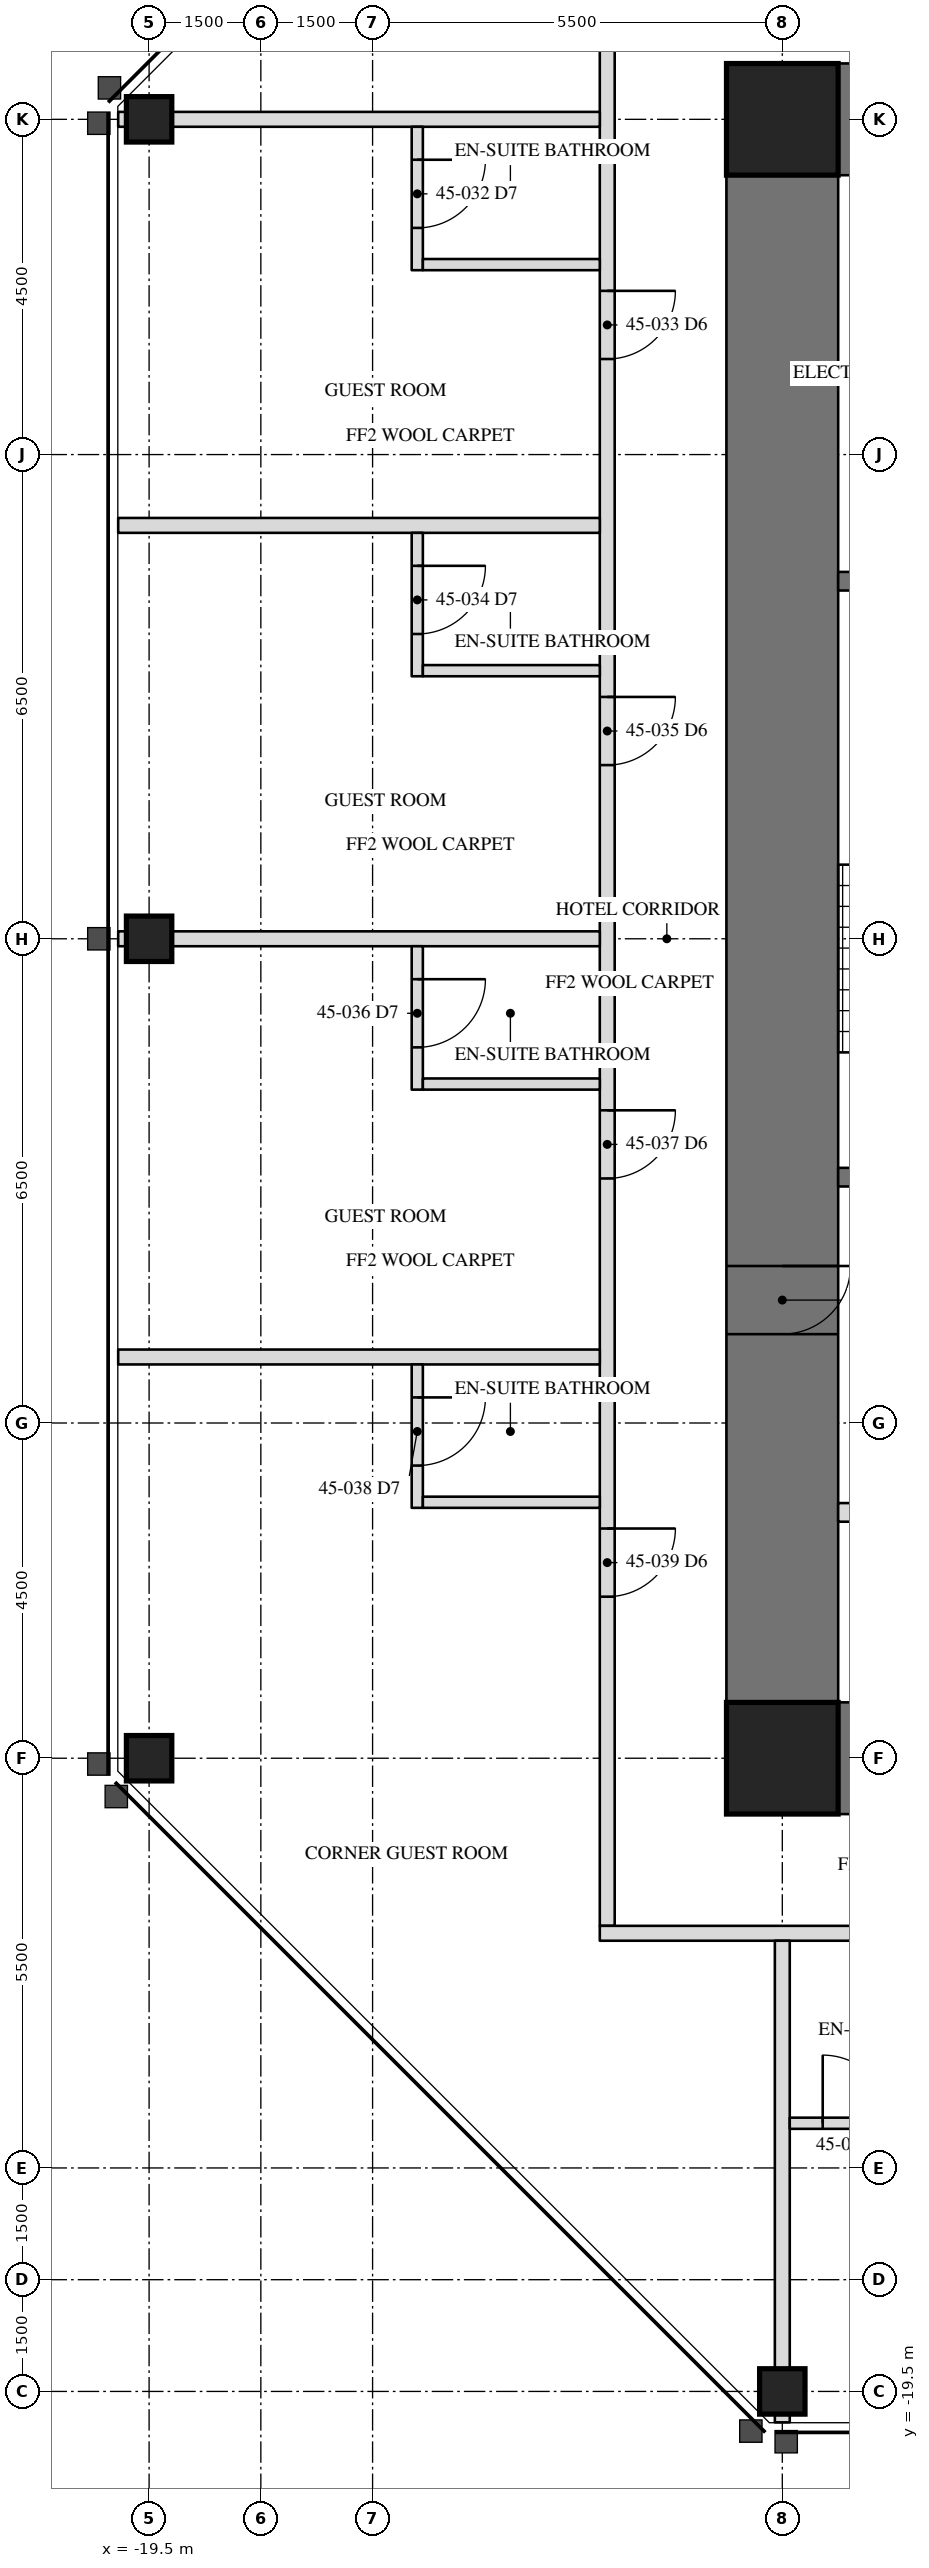
"""IFC4 building model, lengths in metres.
Left out: names, types, materials, properties, quantities, classifications, styles, units other than length and angle.
Written with IfcOpenShell. Run it as: python <this file> out.ifc"""

import sys

from ifc_helpers import new_model, si_unit, direction, frame, frame_2d, origin, origin_2d, place, context, subcontext, project, spatial, rectangle, hollow_rectangle, extrude, element, fill, save


model = new_model("IFC4")
c1 = context("Model", 3, precision=1e-05, world=origin(), true_north=direction((0.0, 1.0)))
c2 = subcontext(c1, "Body", "Model", "MODEL_VIEW")
j1 = project(units=[si_unit("LENGTHUNIT", "METRE"), si_unit("PLANEANGLEUNIT", "RADIAN")], contexts=[c1])
p1 = place(None, origin())
s1 = spatial("IfcSite", under=j1, at=p1, CompositionType="ELEMENT")
p2 = place(p1, origin())
s2 = spatial("IfcBuilding", under=s1, at=p2, CompositionType="ELEMENT")
p3 = place(p2, frame((0.0, 0.0, 194.2)))
s3 = spatial("IfcBuildingStorey", under=s2, at=p3, CompositionType="ELEMENT", Elevation=194.2)
for number, where, z_axis, x_axis in (
    (1, (-19.5, 0.0, 0.0), (0.0, 0.0, 1.0), (0.0, 1.0, 0.0)),
    (2, (-19.5, -11.0, 0.0), (0.0, 0.0, 1.0), (0.0, 1.0, 0.0)),
    (3, (-11.0, -19.5, 0.0), (0.0, 0.0, 1.0), (1.0, 0.0, 0.0)),
    (4, (-19.5, 11.0, 0.0), (0.0, 0.0, 1.0), (0.0, 1.0, 0.0)),
):
    element("IfcColumn", number, at=place(p3, frame(where, z_axis=z_axis, x_axis=x_axis)), inside=s3, PredefinedType="COLUMN", context=c2, shape_type="SweptSolid", body=[
        extrude(hollow_rectangle(XDim=0.61, YDim=0.61, WallThickness=0.076, at=origin_2d()), origin(), (0.0, 0.0, 1.0), 3.5),
    ])
p4 = place(p3, frame((-11.0, 11.0, 0.0), z_axis=(0.0, 0.0, 1.0), x_axis=(0.0, -1.0, 0.0)))
e5 = element("IfcWall", 5, at=p4, inside=s3, PredefinedType="SHEAR", context=c2, shape_type="SweptSolid", body=[
    extrude(rectangle(XDim=22.0, YDim=1.5, at=frame_2d((11.0, 0.0))), origin(), (0.0, 0.0, 1.0), 3.5),
])
p5 = place(p4, frame((15.393, 0.0, 0.0)))
e6 = element("IfcOpeningElement", 6, at=p5, cuts=e5, PredefinedType="OPENING", context=c2, shape_type="SweptSolid", body=[
    extrude(rectangle(XDim=0.915, YDim=2.134, at=frame_2d((0.458, 1.067))), frame((0.0, 0.76, 0.0), z_axis=(0.0, -1.0, 0.0), x_axis=(1.0, 0.0, 0.0)), (0.0, 0.0, 1.0), 1.52),
])
for number, where, z_axis, x_axis in (
    (7, (-6.5, 11.0, 0.0), (0.0, 0.0, 1.0), (-1.0, 0.0, 0.0)),
    (8, (-11.0, -11.0, 0.0), (0.0, 0.0, 1.0), (1.0, 0.0, 0.0)),
):
    element("IfcWall", number, at=place(p3, frame(where, z_axis=z_axis, x_axis=x_axis)), inside=s3, PredefinedType="SHEAR", context=c2, shape_type="SweptSolid", body=[
        extrude(rectangle(XDim=4.5, YDim=1.5, at=frame_2d((2.25, 0.0))), origin(), (0.0, 0.0, 1.0), 3.5),
    ])
for number, where, z_axis, x_axis in (
    (9, (-11.0, 11.0, 0.0), (0.0, 0.0, 1.0), (1.0, 0.0, 0.0)),
    (10, (-11.0, -11.0, 0.0), (0.0, 0.0, 1.0), (1.0, 0.0, 0.0)),
):
    element("IfcColumn", number, at=place(p3, frame(where, z_axis=z_axis, x_axis=x_axis)), inside=s3, PredefinedType="COLUMN", context=c2, shape_type="SweptSolid", body=[
        extrude(hollow_rectangle(XDim=1.499, YDim=1.499, WallThickness=0.102, at=origin_2d()), origin(), (0.0, 0.0, 1.0), 3.5),
    ])
p6 = place(p3, frame((-6.95, 4.8, 0.0), z_axis=(0.0, 0.0, 1.0), x_axis=(-1.0, 0.0, 0.0)))
e11 = element("IfcWall", 11, at=p6, inside=s3, PredefinedType="SOLIDWALL", context=c2, shape_type="SweptSolid", body=[
    extrude(rectangle(XDim=3.3, YDim=0.25, at=frame_2d((1.65, 0.0))), origin(), (0.0, 0.0, 1.0), 3.31),
])
p7 = place(p3, frame((-6.95, -3.2, 0.0), z_axis=(0.0, 0.0, 1.0), x_axis=(-1.0, 0.0, 0.0)))
e12 = element("IfcWall", 12, at=p7, inside=s3, PredefinedType="SOLIDWALL", context=c2, shape_type="SweptSolid", body=[
    extrude(rectangle(XDim=3.3, YDim=0.25, at=frame_2d((1.65, 0.0))), origin(), (0.0, 0.0, 1.0), 3.31),
])
p8 = place(p7, frame((1.116, 0.0, 0.0)))
e13 = element("IfcOpeningElement", 13, at=p8, cuts=e12, PredefinedType="OPENING", context=c2, shape_type="SweptSolid", body=[
    extrude(rectangle(XDim=1.067, YDim=2.134, at=frame_2d((0.533, 1.067))), frame((0.0, 0.135, 0.0), z_axis=(0.0, -1.0, 0.0), x_axis=(1.0, 0.0, 0.0)), (0.0, 0.0, 1.0), 0.27),
])
p9 = place(p3, frame((-6.95, -7.7, 0.0), z_axis=(0.0, 0.0, 1.0), x_axis=(-1.0, 0.0, 0.0)))
e14 = element("IfcWall", 14, at=p9, inside=s3, PredefinedType="PARTITIONING", context=c2, shape_type="SweptSolid", body=[
    extrude(rectangle(XDim=3.3, YDim=0.25, at=frame_2d((1.65, 0.0))), origin(), (0.0, 0.0, 1.0), 3.31),
])
p10 = place(p9, frame((0.45, 0.0, 0.0)))
e15 = element("IfcOpeningElement", 15, at=p10, cuts=e14, PredefinedType="OPENING", context=c2, shape_type="SweptSolid", body=[
    extrude(rectangle(XDim=1.219, YDim=2.134, at=frame_2d((0.609, 1.067))), frame((0.0, 0.135, 0.0), z_axis=(0.0, -1.0, 0.0), x_axis=(1.0, 0.0, 0.0)), (0.0, 0.0, 1.0), 0.27),
])
p11 = place(p3, frame((-13.35, 13.45, 0.0), z_axis=(0.0, 0.0, 1.0), x_axis=(0.0, -1.0, 0.0)))
e16 = element("IfcWall", 16, at=p11, inside=s3, PredefinedType="PARTITIONING", context=c2, shape_type="SweptSolid", body=[
    extrude(rectangle(XDim=26.7, YDim=0.2, at=frame_2d((13.35, 0.0))), origin(), (0.0, 0.0, 1.0), 3.31),
])
p12 = place(p11, frame((4.752, 0.0, 0.0)))
e17 = element("IfcOpeningElement", 17, at=p12, cuts=e16, PredefinedType="OPENING", context=c2, shape_type="SweptSolid", body=[
    extrude(rectangle(XDim=0.915, YDim=2.134, at=frame_2d((0.458, 1.067))), frame((0.0, 0.11, 0.0), z_axis=(0.0, -1.0, 0.0), x_axis=(1.0, 0.0, 0.0)), (0.0, 0.0, 1.0), 0.22),
])
p13 = place(p11, frame((10.204, 0.0, 0.0)))
e18 = element("IfcOpeningElement", 18, at=p13, cuts=e16, PredefinedType="OPENING", context=c2, shape_type="SweptSolid", body=[
    extrude(rectangle(XDim=0.915, YDim=2.134, at=frame_2d((0.458, 1.067))), frame((0.0, 0.11, 0.0), z_axis=(0.0, -1.0, 0.0), x_axis=(1.0, 0.0, 0.0)), (0.0, 0.0, 1.0), 0.22),
])
p14 = place(p11, frame((15.752, 0.0, 0.0)))
e19 = element("IfcOpeningElement", 19, at=p14, cuts=e16, PredefinedType="OPENING", context=c2, shape_type="SweptSolid", body=[
    extrude(rectangle(XDim=0.915, YDim=2.134, at=frame_2d((0.458, 1.067))), frame((0.0, 0.11, 0.0), z_axis=(0.0, -1.0, 0.0), x_axis=(1.0, 0.0, 0.0)), (0.0, 0.0, 1.0), 0.22),
])
p15 = place(p11, frame((21.366, 0.0, 0.0)))
e20 = element("IfcOpeningElement", 20, at=p15, cuts=e16, PredefinedType="OPENING", context=c2, shape_type="SweptSolid", body=[
    extrude(rectangle(XDim=0.915, YDim=2.134, at=frame_2d((0.458, 1.067))), frame((0.0, 0.11, 0.0), z_axis=(0.0, -1.0, 0.0), x_axis=(1.0, 0.0, 0.0)), (0.0, 0.0, 1.0), 0.22),
])
p16 = place(p3, frame((-13.45, -13.35, 0.0), z_axis=(0.0, 0.0, 1.0), x_axis=(1.0, 0.0, 0.0)))
e21 = element("IfcWall", 21, at=p16, inside=s3, PredefinedType="PARTITIONING", context=c2, shape_type="SweptSolid", body=[
    extrude(rectangle(XDim=26.7, YDim=0.2, at=frame_2d((13.35, 0.0))), origin(), (0.0, 0.0, 1.0), 3.31),
])
p17 = place(p16, frame((4.752, 0.0, 0.0)))
e22 = element("IfcOpeningElement", 22, at=p17, cuts=e21, PredefinedType="OPENING", context=c2, shape_type="SweptSolid", body=[
    extrude(rectangle(XDim=0.915, YDim=2.134, at=frame_2d((0.458, 1.067))), frame((0.0, 0.11, 0.0), z_axis=(0.0, -1.0, 0.0), x_axis=(1.0, 0.0, 0.0)), (0.0, 0.0, 1.0), 0.22),
])
p18 = place(p16, frame((10.204, 0.0, 0.0)))
e23 = element("IfcOpeningElement", 23, at=p18, cuts=e21, PredefinedType="OPENING", context=c2, shape_type="SweptSolid", body=[
    extrude(rectangle(XDim=0.915, YDim=2.134, at=frame_2d((0.458, 1.067))), frame((0.0, 0.11, 0.0), z_axis=(0.0, -1.0, 0.0), x_axis=(1.0, 0.0, 0.0)), (0.0, 0.0, 1.0), 0.22),
])
p19 = place(p16, frame((15.752, 0.0, 0.0)))
e24 = element("IfcOpeningElement", 24, at=p19, cuts=e21, PredefinedType="OPENING", context=c2, shape_type="SweptSolid", body=[
    extrude(rectangle(XDim=0.915, YDim=2.134, at=frame_2d((0.458, 1.067))), frame((0.0, 0.11, 0.0), z_axis=(0.0, -1.0, 0.0), x_axis=(1.0, 0.0, 0.0)), (0.0, 0.0, 1.0), 0.22),
])
p20 = place(p16, frame((21.967, 0.0, 0.0)))
e25 = element("IfcOpeningElement", 25, at=p20, cuts=e21, PredefinedType="OPENING", context=c2, shape_type="SweptSolid", body=[
    extrude(rectangle(XDim=0.915, YDim=2.134, at=frame_2d((0.458, 1.067))), frame((0.0, 0.11, 0.0), z_axis=(0.0, -1.0, 0.0), x_axis=(1.0, 0.0, 0.0)), (0.0, 0.0, 1.0), 0.22),
])
p21 = place(p3, frame((-13.45, 11.0, 0.0), z_axis=(0.0, 0.0, 1.0), x_axis=(-1.0, 0.0, 0.0)))
e26 = element("IfcWall", 26, at=p21, inside=s3, PredefinedType="PARTITIONING", context=c2, shape_type="SweptSolid", body=[
    extrude(rectangle(XDim=6.465, YDim=0.2, at=frame_2d((3.232, 0.0))), origin(), (0.0, 0.0, 1.0), 2.802),
])
p22 = place(p3, frame((-13.45, 5.549, 0.0), z_axis=(0.0, 0.0, 1.0), x_axis=(-1.0, 0.0, 0.0)))
e27 = element("IfcWall", 27, at=p22, inside=s3, PredefinedType="PARTITIONING", context=c2, shape_type="SweptSolid", body=[
    extrude(rectangle(XDim=6.465, YDim=0.2, at=frame_2d((3.232, 0.0))), origin(), (0.0, 0.0, 1.0), 3.31),
])
p23 = place(p3, frame((-13.45, 0.0, 0.0), z_axis=(0.0, 0.0, 1.0), x_axis=(-1.0, 0.0, 0.0)))
e28 = element("IfcWall", 28, at=p23, inside=s3, PredefinedType="PARTITIONING", context=c2, shape_type="SweptSolid", body=[
    extrude(rectangle(XDim=6.465, YDim=0.2, at=frame_2d((3.232, 0.0))), origin(), (0.0, 0.0, 1.0), 2.802),
])
p24 = place(p3, frame((-13.45, -5.614, 0.0), z_axis=(0.0, 0.0, 1.0), x_axis=(-1.0, 0.0, 0.0)))
e29 = element("IfcWall", 29, at=p24, inside=s3, PredefinedType="PARTITIONING", context=c2, shape_type="SweptSolid", body=[
    extrude(rectangle(XDim=6.465, YDim=0.2, at=frame_2d((3.232, 0.0))), origin(), (0.0, 0.0, 1.0), 3.31),
])
p25 = place(p3, frame((-15.9, 10.9, 0.0), z_axis=(0.0, 0.0, 1.0), x_axis=(0.0, -1.0, 0.0)))
e30 = element("IfcWall", 30, at=p25, inside=s3, PredefinedType="PARTITIONING", context=c2, shape_type="SweptSolid", body=[
    extrude(rectangle(XDim=1.925, YDim=0.15, at=frame_2d((0.962, 0.0))), origin(), (0.0, 0.0, 1.0), 3.31),
])
p26 = place(p25, frame((0.442, 0.0, 0.0)))
e31 = element("IfcOpeningElement", 31, at=p26, cuts=e30, PredefinedType="OPENING", context=c2, shape_type="SweptSolid", body=[
    extrude(rectangle(XDim=0.915, YDim=2.032, at=frame_2d((0.458, 1.016))), frame((0.0, 0.085, 0.0), z_axis=(0.0, -1.0, 0.0), x_axis=(1.0, 0.0, 0.0)), (0.0, 0.0, 1.0), 0.17),
])
p27 = place(p3, frame((-13.45, 9.05, 0.0), z_axis=(0.0, 0.0, 1.0), x_axis=(-1.0, 0.0, 0.0)))
e32 = element("IfcWall", 32, at=p27, inside=s3, PredefinedType="PARTITIONING", context=c2, shape_type="SweptSolid", body=[
    extrude(rectangle(XDim=2.375, YDim=0.15, at=frame_2d((1.188, 0.0))), origin(), (0.0, 0.0, 1.0), 3.31),
])
p28 = place(p3, frame((-15.9, 5.449, 0.0), z_axis=(0.0, 0.0, 1.0), x_axis=(0.0, -1.0, 0.0)))
e33 = element("IfcWall", 33, at=p28, inside=s3, PredefinedType="PARTITIONING", context=c2, shape_type="SweptSolid", body=[
    extrude(rectangle(XDim=1.925, YDim=0.15, at=frame_2d((0.962, 0.0))), origin(), (0.0, 0.0, 1.0), 3.31),
])
p29 = place(p28, frame((0.442, 0.0, 0.0)))
e34 = element("IfcOpeningElement", 34, at=p29, cuts=e33, PredefinedType="OPENING", context=c2, shape_type="SweptSolid", body=[
    extrude(rectangle(XDim=0.915, YDim=2.032, at=frame_2d((0.458, 1.016))), frame((0.0, 0.085, 0.0), z_axis=(0.0, -1.0, 0.0), x_axis=(1.0, 0.0, 0.0)), (0.0, 0.0, 1.0), 0.17),
])
p30 = place(p3, frame((-13.45, 3.599, 0.0), z_axis=(0.0, 0.0, 1.0), x_axis=(-1.0, 0.0, 0.0)))
e35 = element("IfcWall", 35, at=p30, inside=s3, PredefinedType="PARTITIONING", context=c2, shape_type="SweptSolid", body=[
    extrude(rectangle(XDim=2.375, YDim=0.15, at=frame_2d((1.188, 0.0))), origin(), (0.0, 0.0, 1.0), 2.703),
])
p31 = place(p3, frame((-15.9, -0.1, 0.0), z_axis=(0.0, 0.0, 1.0), x_axis=(0.0, -1.0, 0.0)))
e36 = element("IfcWall", 36, at=p31, inside=s3, PredefinedType="PARTITIONING", context=c2, shape_type="SweptSolid", body=[
    extrude(rectangle(XDim=1.925, YDim=0.15, at=frame_2d((0.962, 0.0))), origin(), (0.0, 0.0, 1.0), 3.31),
])
p32 = place(p31, frame((0.442, 0.0, 0.0)))
e37 = element("IfcOpeningElement", 37, at=p32, cuts=e36, PredefinedType="OPENING", context=c2, shape_type="SweptSolid", body=[
    extrude(rectangle(XDim=0.915, YDim=2.032, at=frame_2d((0.458, 1.016))), frame((0.0, 0.085, 0.0), z_axis=(0.0, -1.0, 0.0), x_axis=(1.0, 0.0, 0.0)), (0.0, 0.0, 1.0), 0.17),
])
p33 = place(p3, frame((-13.45, -1.95, 0.0), z_axis=(0.0, 0.0, 1.0), x_axis=(-1.0, 0.0, 0.0)))
e38 = element("IfcWall", 38, at=p33, inside=s3, PredefinedType="PARTITIONING", context=c2, shape_type="SweptSolid", body=[
    extrude(rectangle(XDim=2.375, YDim=0.15, at=frame_2d((1.188, 0.0))), origin(), (0.0, 0.0, 1.0), 3.31),
])
p34 = place(p3, frame((-15.9, -5.714, 0.0), z_axis=(0.0, 0.0, 1.0), x_axis=(0.0, -1.0, 0.0)))
e39 = element("IfcWall", 39, at=p34, inside=s3, PredefinedType="PARTITIONING", context=c2, shape_type="SweptSolid", body=[
    extrude(rectangle(XDim=1.925, YDim=0.15, at=frame_2d((0.962, 0.0))), origin(), (0.0, 0.0, 1.0), 3.31),
])
p35 = place(p34, frame((0.442, 0.0, 0.0)))
e40 = element("IfcOpeningElement", 40, at=p35, cuts=e39, PredefinedType="OPENING", context=c2, shape_type="SweptSolid", body=[
    extrude(rectangle(XDim=0.915, YDim=2.032, at=frame_2d((0.458, 1.016))), frame((0.0, 0.085, 0.0), z_axis=(0.0, -1.0, 0.0), x_axis=(1.0, 0.0, 0.0)), (0.0, 0.0, 1.0), 0.17),
])
p36 = place(p3, frame((-13.45, -7.564, 0.0), z_axis=(0.0, 0.0, 1.0), x_axis=(-1.0, 0.0, 0.0)))
e41 = element("IfcWall", 41, at=p36, inside=s3, PredefinedType="PARTITIONING", context=c2, shape_type="SweptSolid", body=[
    extrude(rectangle(XDim=2.375, YDim=0.15, at=frame_2d((1.188, 0.0))), origin(), (0.0, 0.0, 1.0), 3.31),
])
p37 = place(p3, frame((-11.0, -13.45, 0.0), z_axis=(0.0, 0.0, 1.0), x_axis=(0.0, -1.0, 0.0)))
e42 = element("IfcWall", 42, at=p37, inside=s3, PredefinedType="PARTITIONING", context=c2, shape_type="SweptSolid", body=[
    extrude(rectangle(XDim=6.465, YDim=0.2, at=frame_2d((3.232, 0.0))), origin(), (0.0, 0.0, 1.0), 2.802),
])
p38 = place(p3, frame((-10.9, -15.9, 0.0), z_axis=(0.0, 0.0, 1.0), x_axis=(1.0, 0.0, 0.0)))
e43 = element("IfcWall", 43, at=p38, inside=s3, PredefinedType="PARTITIONING", context=c2, shape_type="SweptSolid", body=[
    extrude(rectangle(XDim=1.925, YDim=0.15, at=frame_2d((0.962, 0.0))), origin(), (0.0, 0.0, 1.0), 3.31),
])
p39 = place(p38, frame((0.442, 0.0, 0.0)))
e44 = element("IfcOpeningElement", 44, at=p39, cuts=e43, PredefinedType="OPENING", context=c2, shape_type="SweptSolid", body=[
    extrude(rectangle(XDim=0.915, YDim=2.032, at=frame_2d((0.458, 1.016))), frame((0.0, 0.085, 0.0), z_axis=(0.0, -1.0, 0.0), x_axis=(1.0, 0.0, 0.0)), (0.0, 0.0, 1.0), 0.17),
])
p40 = place(p5, origin())
e45 = element("IfcDoor", 45, at=p40, inside=s3, OperationType="SINGLE_SWING_RIGHT", PredefinedType="DOOR", context=c2, shape_type="SweptSolid", body=[
    extrude(rectangle(XDim=0.915, YDim=2.134, at=frame_2d((0.458, 1.067))), frame((0.0, -0.675, 0.0), z_axis=(0.0, -1.0, 0.0), x_axis=(1.0, 0.0, 0.0)), (0.0, 0.0, 1.0), 0.05),
])
fill(e6, e45)
p41 = place(p26, origin())
e46 = element("IfcDoor", 46, at=p41, inside=s3, OperationType="SINGLE_SWING_LEFT", PredefinedType="DOOR", context=c2, shape_type="SweptSolid", body=[
    extrude(rectangle(XDim=0.915, YDim=2.032, at=frame_2d((0.458, 1.016))), frame((0.0, 0.025, 0.0), z_axis=(0.0, -1.0, 0.0), x_axis=(1.0, 0.0, 0.0)), (0.0, 0.0, 1.0), 0.05),
])
fill(e31, e46)
p42 = place(p12, origin())
e47 = element("IfcDoor", 47, at=p42, inside=s3, OperationType="SINGLE_SWING_LEFT", PredefinedType="DOOR", context=c2, shape_type="SweptSolid", body=[
    extrude(rectangle(XDim=0.915, YDim=2.134, at=frame_2d((0.458, 1.067))), frame((0.0, 0.025, 0.0), z_axis=(0.0, -1.0, 0.0), x_axis=(1.0, 0.0, 0.0)), (0.0, 0.0, 1.0), 0.05),
])
fill(e17, e47)
p43 = place(p29, origin())
e48 = element("IfcDoor", 48, at=p43, inside=s3, OperationType="SINGLE_SWING_LEFT", PredefinedType="DOOR", context=c2, shape_type="SweptSolid", body=[
    extrude(rectangle(XDim=0.915, YDim=2.032, at=frame_2d((0.458, 1.016))), frame((0.0, 0.025, 0.0), z_axis=(0.0, -1.0, 0.0), x_axis=(1.0, 0.0, 0.0)), (0.0, 0.0, 1.0), 0.05),
])
fill(e34, e48)
p44 = place(p13, origin())
e49 = element("IfcDoor", 49, at=p44, inside=s3, OperationType="SINGLE_SWING_LEFT", PredefinedType="DOOR", context=c2, shape_type="SweptSolid", body=[
    extrude(rectangle(XDim=0.915, YDim=2.134, at=frame_2d((0.458, 1.067))), frame((0.0, 0.025, 0.0), z_axis=(0.0, -1.0, 0.0), x_axis=(1.0, 0.0, 0.0)), (0.0, 0.0, 1.0), 0.05),
])
fill(e18, e49)
p45 = place(p32, origin())
e50 = element("IfcDoor", 50, at=p45, inside=s3, OperationType="SINGLE_SWING_LEFT", PredefinedType="DOOR", context=c2, shape_type="SweptSolid", body=[
    extrude(rectangle(XDim=0.915, YDim=2.032, at=frame_2d((0.458, 1.016))), frame((0.0, 0.025, 0.0), z_axis=(0.0, -1.0, 0.0), x_axis=(1.0, 0.0, 0.0)), (0.0, 0.0, 1.0), 0.05),
])
fill(e37, e50)
p46 = place(p14, origin())
e51 = element("IfcDoor", 51, at=p46, inside=s3, OperationType="SINGLE_SWING_LEFT", PredefinedType="DOOR", context=c2, shape_type="SweptSolid", body=[
    extrude(rectangle(XDim=0.915, YDim=2.134, at=frame_2d((0.458, 1.067))), frame((0.0, 0.025, 0.0), z_axis=(0.0, -1.0, 0.0), x_axis=(1.0, 0.0, 0.0)), (0.0, 0.0, 1.0), 0.05),
])
fill(e19, e51)
p47 = place(p35, origin())
e52 = element("IfcDoor", 52, at=p47, inside=s3, OperationType="SINGLE_SWING_LEFT", PredefinedType="DOOR", context=c2, shape_type="SweptSolid", body=[
    extrude(rectangle(XDim=0.915, YDim=2.032, at=frame_2d((0.458, 1.016))), frame((0.0, 0.025, 0.0), z_axis=(0.0, -1.0, 0.0), x_axis=(1.0, 0.0, 0.0)), (0.0, 0.0, 1.0), 0.05),
])
fill(e40, e52)
p48 = place(p15, origin())
e53 = element("IfcDoor", 53, at=p48, inside=s3, OperationType="SINGLE_SWING_LEFT", PredefinedType="DOOR", context=c2, shape_type="SweptSolid", body=[
    extrude(rectangle(XDim=0.915, YDim=2.134, at=frame_2d((0.458, 1.067))), frame((0.0, 0.025, 0.0), z_axis=(0.0, -1.0, 0.0), x_axis=(1.0, 0.0, 0.0)), (0.0, 0.0, 1.0), 0.05),
])
fill(e20, e53)
p49 = place(p39, origin())
e54 = element("IfcDoor", 54, at=p49, inside=s3, OperationType="SINGLE_SWING_LEFT", PredefinedType="DOOR", context=c2, shape_type="SweptSolid", body=[
    extrude(rectangle(XDim=0.915, YDim=2.032, at=frame_2d((0.458, 1.016))), frame((0.0, 0.025, 0.0), z_axis=(0.0, -1.0, 0.0), x_axis=(1.0, 0.0, 0.0)), (0.0, 0.0, 1.0), 0.05),
])
fill(e44, e54)
save(model, sys.argv[1])
